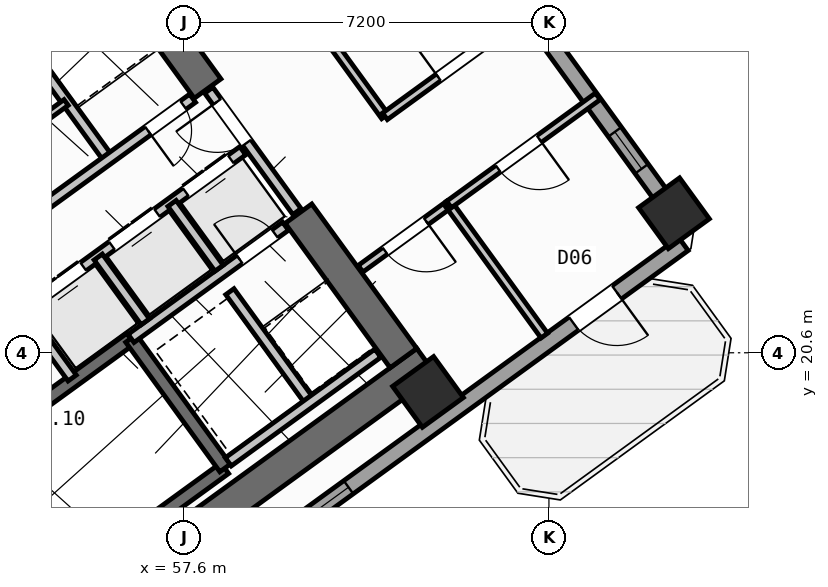
"""IFC4 building model, lengths in metres.
Left out: names, types, materials, properties, quantities, classifications, styles, units other than length and angle.
Written with IfcOpenShell. Run it as: python <this file> out.ifc"""

import sys

from ifc_helpers import new_model, si_unit, direction, frame, frame_2d, origin, origin_2d, place, context, subcontext, project, spatial, rectangle, hollow_rectangle, extrude, source, transform, mapped, element, fill, save


model = new_model("IFC4")
c1 = context("Model", 3, precision=1e-05, world=origin(), true_north=direction((0.0, 1.0)))
c2 = subcontext(c1, "Body", "Model", "MODEL_VIEW")
j1 = project(units=[si_unit("LENGTHUNIT", "METRE"), si_unit("PLANEANGLEUNIT", "RADIAN")], contexts=[c1])
p1 = place(None, origin())
s1 = spatial("IfcSite", under=j1, at=p1, CompositionType="ELEMENT")
p2 = place(p1, origin())
s2 = spatial("IfcBuilding", under=s1, at=p2, CompositionType="ELEMENT")
p3 = place(p2, frame((0.0, 0.0, 81.0)))
s3 = spatial("IfcBuildingStorey", under=s2, at=p3, CompositionType="ELEMENT", Elevation=81.0)
p4 = place(p3, frame((52.318, 13.11, 0.0), z_axis=(0.0, 0.0, 1.0), x_axis=(0.809019445368, 0.587781878776, 0.0)))
e1 = element("IfcWall", 1, at=p4, inside=s3, PredefinedType="SHEAR", context=c2, shape_type="SweptSolid", body=[
    extrude(rectangle(XDim=12.44, YDim=0.65, at=frame_2d((6.22, 0.0))), origin(), (0.0, 0.0, 1.0), 3.32),
])
p5 = place(p3, frame((61.929, 20.494, 0.0), z_axis=(0.0, 0.0, 1.0), x_axis=(-0.58782982593, 0.808984607855, 0.0)))
e2 = element("IfcWall", 2, at=p5, inside=s3, PredefinedType="SHEAR", context=c2, shape_type="SweptSolid", body=[
    extrude(rectangle(XDim=3.525, YDim=0.65, at=frame_2d((1.762, 0.0))), origin(), (0.0, 0.0, 1.0), 3.32),
])
p6 = place(p3, frame((58.064, 25.813, 0.0), z_axis=(0.0, 0.0, 1.0), x_axis=(-0.58777996584, 0.809020835181, 0.0)))
e3 = element("IfcWall", 3, at=p6, inside=s3, PredefinedType="SHEAR", context=c2, shape_type="SweptSolid", body=[
    extrude(rectangle(XDim=6.375, YDim=0.65, at=frame_2d((3.188, 0.0))), origin(), (0.0, 0.0, 1.0), 3.32),
])
m1 = source(origin(), c2, "Body", "SweptSolid", [
    extrude(hollow_rectangle(XDim=1.0, YDim=1.0, WallThickness=0.04, at=origin_2d()), origin(), (0.0, 0.0, 1.0), 3.6),
])
for number, where, z_axis, x_axis in (
    (4, (62.414, 19.827, 0.0), (0.0, 0.0, 1.0), (0.809, 0.588, 0.0)),
    (5, (67.268, 23.354, 0.0), (0.0, 0.0, 1.0), (0.809, 0.588, 0.0)),
):
    element("IfcColumn", number, at=place(p3, frame(where, z_axis=z_axis, x_axis=x_axis)), inside=s3, PredefinedType="COLUMN", context=c2, shape_type="MappedRepresentation", body=[
        mapped(m1, transform((0.0, 0.0, 0.0), scale=1.0)),
    ])
p7 = place(p3, frame((54.81, 40.5, 0.0), z_axis=(0.0, 0.0, 1.0), x_axis=(0.587783625747, -0.809018176127, 0.0)))
e6 = element("IfcWall", 6, at=p7, inside=s3, PredefinedType="STANDARD", context=c2, shape_type="SweptSolid", body=[
    extrude(rectangle(XDim=21.587, YDim=0.32, at=frame_2d((10.794, 0.0))), origin(), (0.0, 0.0, 1.0), 2.745),
])
p8 = place(p7, frame((2.356, 0.0, 0.8)))
e7 = element("IfcOpeningElement", 7, at=p8, cuts=e6, PredefinedType="OPENING", context=c2, shape_type="SweptSolid", body=[
    extrude(rectangle(XDim=2.1, YDim=1.55, at=frame_2d((1.05, 0.775))), frame((0.0, 0.17, 0.0), z_axis=(0.0, -1.0, 0.0), x_axis=(1.0, 0.0, 0.0)), (0.0, 0.0, 1.0), 0.34),
])
p9 = place(p7, frame((9.344, 0.0, 0.85)))
e8 = element("IfcOpeningElement", 8, at=p9, cuts=e6, PredefinedType="OPENING", context=c2, shape_type="SweptSolid", body=[
    extrude(rectangle(XDim=1.8, YDim=1.5, at=frame_2d((0.9, 0.75))), frame((0.0, 0.17, 0.0), z_axis=(0.0, -1.0, 0.0), x_axis=(1.0, 0.0, 0.0)), (0.0, 0.0, 1.0), 0.34),
])
p10 = place(p7, frame((19.209, 0.0, 1.0)))
e9 = element("IfcOpeningElement", 9, at=p10, cuts=e6, PredefinedType="OPENING", context=c2, shape_type="SweptSolid", body=[
    extrude(rectangle(XDim=0.9, YDim=1.25, at=frame_2d((0.45, 0.625))), frame((0.0, 0.17, 0.0), z_axis=(0.0, -1.0, 0.0), x_axis=(1.0, 0.0, 0.0)), (0.0, 0.0, 1.0), 0.34),
])
p11 = place(p3, frame((67.454, 22.747, 0.0), z_axis=(0.0, 0.0, 1.0), x_axis=(-0.809021120468, -0.587779573171, 0.0)))
e10 = element("IfcWall", 10, at=p11, inside=s3, PredefinedType="STANDARD", context=c2, shape_type="SweptSolid", body=[
    extrude(rectangle(XDim=17.588, YDim=0.32, at=frame_2d((8.794, 0.0))), origin(), (0.0, 0.0, 1.0), 3.32),
])
p12 = place(p11, frame((1.624, 0.0, 0.0)))
e11 = element("IfcOpeningElement", 11, at=p12, cuts=e10, PredefinedType="OPENING", context=c2, shape_type="SweptSolid", body=[
    extrude(rectangle(XDim=1.05, YDim=2.15, at=frame_2d((0.525, 1.075))), frame((0.0, 0.17, 0.0), z_axis=(0.0, -1.0, 0.0), x_axis=(1.0, 0.0, 0.0)), (0.0, 0.0, 1.0), 0.34),
])
p13 = place(p11, frame((8.169, 0.0, 0.8)))
e12 = element("IfcOpeningElement", 12, at=p13, cuts=e10, PredefinedType="OPENING", context=c2, shape_type="SweptSolid", body=[
    extrude(rectangle(XDim=2.1, YDim=1.55, at=frame_2d((1.05, 0.775))), frame((0.0, 0.17, 0.0), z_axis=(0.0, -1.0, 0.0), x_axis=(1.0, 0.0, 0.0)), (0.0, 0.0, 1.0), 0.34),
])
p14 = place(p11, frame((13.319, 0.0, 0.8)))
e13 = element("IfcOpeningElement", 13, at=p14, cuts=e10, PredefinedType="OPENING", context=c2, shape_type="SweptSolid", body=[
    extrude(rectangle(XDim=2.1, YDim=1.55, at=frame_2d((1.05, 0.775))), frame((0.0, 0.17, 0.0), z_axis=(0.0, -1.0, 0.0), x_axis=(1.0, 0.0, 0.0)), (0.0, 0.0, 1.0), 0.34),
])
p15 = place(p3, frame((49.863, 23.44, 0.0), z_axis=(0.0, 0.0, 1.0), x_axis=(0.809003474932, 0.587803859759, 0.0)))
e14 = element("IfcWall", 14, at=p15, inside=s3, PredefinedType="SHEAR", context=c2, shape_type="SweptSolid", body=[
    extrude(rectangle(XDim=7.46, YDim=0.26, at=frame_2d((3.73, 0.0))), origin(), (0.0, 0.0, 1.0), 3.32),
])
p16 = place(p15, frame((0.36, 0.0, 0.0)))
e15 = element("IfcOpeningElement", 15, at=p16, cuts=e14, PredefinedType="OPENING", context=c2, shape_type="SweptSolid", body=[
    extrude(rectangle(XDim=0.86, YDim=2.05, at=frame_2d((0.43, 1.025))), frame((0.0, 0.14, 0.0), z_axis=(0.0, -1.0, 0.0), x_axis=(1.0, 0.0, 0.0)), (0.0, 0.0, 1.0), 0.28),
])
p17 = place(p3, frame((52.472, 14.013, 0.0), z_axis=(0.0, 0.0, 1.0), x_axis=(0.809028366311, 0.587769599847, 0.0)))
e16 = element("IfcWall", 16, at=p17, inside=s3, PredefinedType="SHEAR", context=c2, shape_type="SweptSolid", body=[
    extrude(rectangle(XDim=7.33, YDim=0.26, at=frame_2d((3.665, 0.0))), origin(), (0.0, 0.0, 1.0), 3.32),
])
p18 = place(p3, frame((50.615, 16.57, 0.0), z_axis=(0.0, 0.0, 1.0), x_axis=(0.809028366311, 0.587769599847, 0.0)))
e17 = element("IfcWall", 17, at=p18, inside=s3, PredefinedType="SHEAR", context=c2, shape_type="SweptSolid", body=[
    extrude(rectangle(XDim=7.33, YDim=0.26, at=frame_2d((3.665, 0.0))), origin(), (0.0, 0.0, 1.0), 3.32),
])
p19 = place(p18, frame((0.22, 0.0, 0.0)))
e18 = element("IfcOpeningElement", 18, at=p19, cuts=e17, PredefinedType="OPENING", context=c2, shape_type="SweptSolid", body=[
    extrude(rectangle(XDim=1.1, YDim=2.1, at=frame_2d((0.55, 1.05))), frame((0.0, 0.14, 0.0), z_axis=(0.0, -1.0, 0.0), x_axis=(1.0, 0.0, 0.0)), (0.0, 0.0, 1.0), 0.28),
])
p20 = place(p3, frame((58.41, 18.327, 0.0), z_axis=(0.0, 0.0, 1.0), x_axis=(-0.58776738483, 0.809029975545, 0.0)))
e19 = element("IfcWall", 19, at=p20, inside=s3, PredefinedType="SHEAR", context=c2, shape_type="SweptSolid", body=[
    extrude(rectangle(XDim=3.16, YDim=0.26, at=frame_2d((1.58, 0.0))), origin(), (0.0, 0.0, 1.0), 3.32),
])
p21 = place(p3, frame((56.553, 20.884, 0.0), z_axis=(0.0, 0.0, 1.0), x_axis=(0.809035789462, 0.587759382205, 0.0)))
e20 = element("IfcWall", 20, at=p21, inside=s3, PredefinedType="STANDARD", context=c2, shape_type="SweptSolid", body=[
    extrude(rectangle(XDim=3.768, YDim=0.2, at=frame_2d((1.884, 0.0))), origin(), (0.0, 0.0, 1.0), 3.31),
])
p22 = place(p21, frame((2.65, 0.0, 0.0)))
e21 = element("IfcOpeningElement", 21, at=p22, cuts=e20, PredefinedType="OPENING", context=c2, shape_type="SweptSolid", body=[
    extrude(rectangle(XDim=0.86, YDim=2.05, at=frame_2d((0.43, 1.025))), frame((0.0, 0.11, 0.0), z_axis=(0.0, -1.0, 0.0), x_axis=(1.0, 0.0, 0.0)), (0.0, 0.0, 1.0), 0.22),
])
p23 = place(p3, frame((54.421, 21.436, 0.0), z_axis=(0.0, 0.0, 1.0), x_axis=(0.809013710463, 0.587789772183, 0.0)))
e22 = element("IfcWall", 22, at=p23, inside=s3, PredefinedType="STANDARD", context=c2, shape_type="SweptSolid", body=[
    extrude(rectangle(XDim=5.36, YDim=0.2, at=frame_2d((2.68, 0.0))), origin(), (0.0, 0.0, 1.0), 3.31),
])
p24 = place(p23, frame((0.37, 0.0, 0.0)))
e23 = element("IfcOpeningElement", 23, at=p24, cuts=e22, PredefinedType="OPENING", context=c2, shape_type="SweptSolid", body=[
    extrude(rectangle(XDim=1.1, YDim=2.15, at=frame_2d((0.55, 1.075))), frame((0.0, 0.11, 0.0), z_axis=(0.0, -1.0, 0.0), x_axis=(1.0, 0.0, 0.0)), (0.0, 0.0, 1.0), 0.22),
])
p25 = place(p23, frame((2.17, 0.0, 0.0)))
e24 = element("IfcOpeningElement", 24, at=p25, cuts=e22, PredefinedType="OPENING", context=c2, shape_type="SweptSolid", body=[
    extrude(rectangle(XDim=1.1, YDim=2.15, at=frame_2d((0.55, 1.075))), frame((0.0, 0.11, 0.0), z_axis=(0.0, -1.0, 0.0), x_axis=(1.0, 0.0, 0.0)), (0.0, 0.0, 1.0), 0.22),
])
p26 = place(p23, frame((3.97, 0.0, 0.0)))
e25 = element("IfcOpeningElement", 25, at=p26, cuts=e22, PredefinedType="OPENING", context=c2, shape_type="SweptSolid", body=[
    extrude(rectangle(XDim=1.1, YDim=2.15, at=frame_2d((0.55, 1.075))), frame((0.0, 0.11, 0.0), z_axis=(0.0, -1.0, 0.0), x_axis=(1.0, 0.0, 0.0)), (0.0, 0.0, 1.0), 0.22),
])
p27 = place(p3, frame((55.391, 20.102, 0.0), z_axis=(0.0, 0.0, 1.0), x_axis=(-0.58778447739, 0.809017557374, 0.0)))
e26 = element("IfcWall", 26, at=p27, inside=s3, PredefinedType="STANDARD", context=c2, shape_type="SweptSolid", body=[
    extrude(rectangle(XDim=1.65, YDim=0.2, at=frame_2d((0.825, 0.0))), origin(), (0.0, 0.0, 1.0), 3.31),
])
p28 = place(p3, frame((56.834, 21.212, 0.0), z_axis=(0.0, 0.0, 1.0), x_axis=(-0.58776738483, 0.809029975545, 0.0)))
e27 = element("IfcWall", 27, at=p28, inside=s3, PredefinedType="STANDARD", context=c2, shape_type="SweptSolid", body=[
    extrude(rectangle(XDim=1.58, YDim=0.2, at=frame_2d((0.79, 0.0))), origin(), (0.0, 0.0, 1.0), 3.31),
])
p29 = place(p3, frame((58.29, 22.27, 0.0), z_axis=(0.0, 0.0, 1.0), x_axis=(-0.587840865826, 0.808976585857, 0.0)))
e28 = element("IfcWall", 28, at=p29, inside=s3, PredefinedType="STANDARD", context=c2, shape_type="SweptSolid", body=[
    extrude(rectangle(XDim=1.58, YDim=0.2, at=frame_2d((0.79, 0.0))), origin(), (0.0, 0.0, 1.0), 3.31),
])
p30 = place(p3, frame((60.067, 19.655, 0.0), z_axis=(0.0, 0.0, 1.0), x_axis=(-0.587800520745, 0.809005900975, 0.0)))
e29 = element("IfcWall", 29, at=p30, inside=s3, PredefinedType="STANDARD", context=c2, shape_type="SweptSolid", body=[
    extrude(rectangle(XDim=2.66, YDim=0.2, at=frame_2d((1.33, 0.0))), origin(), (0.0, 0.0, 1.0), 3.31),
])
p31 = place(p3, frame((58.472, 18.447, 0.0), z_axis=(0.0, 0.0, 1.0), x_axis=(0.809022487728, 0.587777691266, 0.0)))
e30 = element("IfcWall", 30, at=p31, inside=s3, PredefinedType="STANDARD", context=c2, shape_type="SweptSolid", body=[
    extrude(rectangle(XDim=3.648, YDim=0.2, at=frame_2d((1.824, 0.0))), origin(), (0.0, 0.0, 1.0), 3.31),
])
p32 = place(p3, frame((56.111, 24.419, 0.0), z_axis=(0.0, 0.0, 1.0), x_axis=(-0.58777848983, 0.809021907548, 0.0)))
e31 = element("IfcWall", 31, at=p32, inside=s3, PredefinedType="STANDARD", context=c2, shape_type="SweptSolid", body=[
    extrude(rectangle(XDim=2.88, YDim=0.2, at=frame_2d((1.44, 0.0))), origin(), (0.0, 0.0, 1.0), 3.31),
])
p33 = place(p3, frame((53.425, 22.468, 0.0), z_axis=(0.0, 0.0, 1.0), x_axis=(0.80902705128, 0.587771409902, 0.0)))
e32 = element("IfcWall", 32, at=p33, inside=s3, PredefinedType="STANDARD", context=c2, shape_type="SweptSolid", body=[
    extrude(rectangle(XDim=5.368, YDim=0.2, at=frame_2d((2.684, 0.0))), origin(), (0.0, 0.0, 1.0), 3.31),
])
p34 = place(p33, frame((4.28, 0.0, 0.0)))
e33 = element("IfcOpeningElement", 33, at=p34, cuts=e32, PredefinedType="OPENING", context=c2, shape_type="SweptSolid", body=[
    extrude(rectangle(XDim=0.86, YDim=2.05, at=frame_2d((0.43, 1.025))), frame((0.0, 0.11, 0.0), z_axis=(0.0, -1.0, 0.0), x_axis=(1.0, 0.0, 0.0)), (0.0, 0.0, 1.0), 0.22),
])
p35 = place(p33, frame((0.35, 0.0, 0.0)))
e34 = element("IfcOpeningElement", 34, at=p35, cuts=e32, PredefinedType="OPENING", context=c2, shape_type="SweptSolid", body=[
    extrude(rectangle(XDim=0.86, YDim=2.05, at=frame_2d((0.43, 1.025))), frame((0.0, 0.11, 0.0), z_axis=(0.0, -1.0, 0.0), x_axis=(1.0, 0.0, 0.0)), (0.0, 0.0, 1.0), 0.22),
])
p36 = place(p3, frame((52.618, 23.612, 0.0), z_axis=(0.0, 0.0, 1.0), x_axis=(0.809009587469, 0.587795446889, 0.0)))
e35 = element("IfcWall", 35, at=p36, inside=s3, PredefinedType="PLUMBINGWALL", context=c2, shape_type="SweptSolid", body=[
    extrude(rectangle(XDim=3.28, YDim=0.14, at=frame_2d((1.64, 0.0))), origin(), (0.0, 0.0, 1.0), 3.31),
])
p37 = place(p36, frame((0.25, 0.0, 0.0)))
e36 = element("IfcOpeningElement", 36, at=p37, cuts=e35, PredefinedType="OPENING", context=c2, shape_type="SweptSolid", body=[
    extrude(rectangle(XDim=0.78, YDim=2.05, at=frame_2d((0.39, 1.025))), frame((0.0, 0.08, 0.0), z_axis=(0.0, -1.0, 0.0), x_axis=(1.0, 0.0, 0.0)), (0.0, 0.0, 1.0), 0.16),
])
p38 = place(p36, frame((1.92, 0.0, 0.0)))
e37 = element("IfcOpeningElement", 37, at=p38, cuts=e35, PredefinedType="OPENING", context=c2, shape_type="SweptSolid", body=[
    extrude(rectangle(XDim=0.78, YDim=2.05, at=frame_2d((0.39, 1.025))), frame((0.0, 0.08, 0.0), z_axis=(0.0, -1.0, 0.0), x_axis=(1.0, 0.0, 0.0)), (0.0, 0.0, 1.0), 0.16),
])
p39 = place(p3, frame((59.827, 23.386, 0.0), z_axis=(0.0, 0.0, 1.0), x_axis=(-0.587803840107, 0.809003489211, 0.0)))
e38 = element("IfcWall", 38, at=p39, inside=s3, PredefinedType="STANDARD", context=c2, shape_type="SweptSolid", body=[
    extrude(rectangle(XDim=2.96, YDim=0.2, at=frame_2d((1.48, 0.0))), origin(), (0.0, 0.0, 1.0), 3.31),
])
p40 = place(p39, frame((1.68, 0.0, 0.0)))
e39 = element("IfcOpeningElement", 39, at=p40, cuts=e38, PredefinedType="OPENING", context=c2, shape_type="SweptSolid", body=[
    extrude(rectangle(XDim=1.0, YDim=2.1, at=frame_2d((0.5, 1.05))), frame((0.0, 0.11, 0.0), z_axis=(0.0, -1.0, 0.0), x_axis=(1.0, 0.0, 0.0)), (0.0, 0.0, 1.0), 0.22),
])
p41 = place(p3, frame((61.082, 22.259, 0.0), z_axis=(0.0, 0.0, 1.0), x_axis=(0.809044195715, 0.587747811039, 0.0)))
e40 = element("IfcWall", 40, at=p41, inside=s3, PredefinedType="PARTITIONING", context=c2, shape_type="SweptSolid", body=[
    extrude(rectangle(XDim=2.158, YDim=0.16, at=frame_2d((1.079, 0.0))), origin(), (0.0, 0.0, 1.0), 3.31),
])
p42 = place(p41, frame((0.598, 0.0, 0.0)))
e41 = element("IfcOpeningElement", 41, at=p42, cuts=e40, PredefinedType="OPENING", context=c2, shape_type="SweptSolid", body=[
    extrude(rectangle(XDim=1.0, YDim=2.1, at=frame_2d((0.5, 1.05))), frame((0.0, 0.09, 0.0), z_axis=(0.0, -1.0, 0.0), x_axis=(1.0, 0.0, 0.0)), (0.0, 0.0, 1.0), 0.18),
])
p43 = place(p3, frame((64.709, 20.938, 0.0), z_axis=(0.0, 0.0, 1.0), x_axis=(-0.587772420479, 0.809026317077, 0.0)))
e42 = element("IfcWall", 42, at=p43, inside=s3, PredefinedType="PARTITIONING", context=c2, shape_type="SweptSolid", body=[
    extrude(rectangle(XDim=3.2, YDim=0.16, at=frame_2d((1.6, 0.0))), origin(), (0.0, 0.0, 1.0), 3.31),
])
p44 = place(p3, frame((61.564, 25.266, 0.0), z_axis=(0.0, 0.0, 1.0), x_axis=(-0.587784527444, 0.809017521007, 0.0)))
e43 = element("IfcWall", 43, at=p44, inside=s3, PredefinedType="PARTITIONING", context=c2, shape_type="SweptSolid", body=[
    extrude(rectangle(XDim=16.35, YDim=0.16, at=frame_2d((8.175, 0.0))), origin(), (0.0, 0.0, 1.0), 3.31),
])
p45 = place(p3, frame((62.828, 23.527, 0.0), z_axis=(0.0, 0.0, 1.0), x_axis=(0.809003564202, 0.587803736896, 0.0)))
e44 = element("IfcWall", 44, at=p45, inside=s3, PredefinedType="PARTITIONING", context=c2, shape_type="SweptSolid", body=[
    extrude(rectangle(XDim=3.63, YDim=0.16, at=frame_2d((1.815, 0.0))), origin(), (0.0, 0.0, 1.0), 3.31),
])
p46 = place(p45, frame((1.2, 0.0, 0.0)))
e45 = element("IfcOpeningElement", 45, at=p46, cuts=e44, PredefinedType="OPENING", context=c2, shape_type="SweptSolid", body=[
    extrude(rectangle(XDim=1.0, YDim=2.1, at=frame_2d((0.5, 1.05))), frame((0.0, 0.09, 0.0), z_axis=(0.0, -1.0, 0.0), x_axis=(1.0, 0.0, 0.0)), (0.0, 0.0, 1.0), 0.18),
])
p47 = place(p3, frame((61.564, 25.266, 0.0), z_axis=(0.0, 0.0, 1.0), x_axis=(0.809012309495, 0.587791700422, 0.0)))
e46 = element("IfcWall", 46, at=p47, inside=s3, PredefinedType="PARTITIONING", context=c2, shape_type="SweptSolid", body=[
    extrude(rectangle(XDim=3.63, YDim=0.16, at=frame_2d((1.815, 0.0))), origin(), (0.0, 0.0, 1.0), 3.31),
])
p48 = place(p47, frame((1.305, 0.0, 0.0)))
e47 = element("IfcOpeningElement", 47, at=p48, cuts=e46, PredefinedType="OPENING", context=c2, shape_type="SweptSolid", body=[
    extrude(rectangle(XDim=1.0, YDim=2.1, at=frame_2d((0.5, 1.05))), frame((0.0, 0.09, 0.0), z_axis=(0.0, -1.0, 0.0), x_axis=(1.0, 0.0, 0.0)), (0.0, 0.0, 1.0), 0.18),
])
m2 = source(origin(), c2, "Body", "SweptSolid", [
    extrude(rectangle(XDim=1.05, YDim=2.15, at=frame_2d((0.525, 1.075))), frame((0.0, 0.025, 0.0), z_axis=(0.0, -1.0, 0.0), x_axis=(1.0, 0.0, 0.0)), (0.0, 0.0, 1.0), 0.05),
])
p49 = place(p12, origin())
e48 = element("IfcDoor", 48, at=p49, inside=s3, OperationType="SINGLE_SWING_LEFT", PredefinedType="DOOR", context=c2, shape_type="MappedRepresentation", body=[
    mapped(m2, transform((0.0, 0.0, 0.0), scale=1.0)),
])
fill(e11, e48)
m3 = source(origin(), c2, "Body", "SweptSolid", [
    extrude(rectangle(XDim=0.9, YDim=1.25, at=frame_2d((0.45, 0.625))), frame((0.0, 0.03, 0.0), z_axis=(0.0, -1.0, 0.0), x_axis=(1.0, 0.0, 0.0)), (0.0, 0.0, 1.0), 0.06),
])
p50 = place(p10, origin())
e49 = element("IfcWindow", 49, at=p50, inside=s3, PartitioningType="SINGLE_PANEL", PredefinedType="WINDOW", context=c2, shape_type="MappedRepresentation", body=[
    mapped(m3, transform((0.0, 0.0, 0.0), scale=1.0)),
])
fill(e9, e49)
m4 = source(origin(), c2, "Body", "SweptSolid", [
    extrude(rectangle(XDim=2.1, YDim=1.55, at=frame_2d((1.05, 0.775))), frame((0.0, 0.03, 0.0), z_axis=(0.0, -1.0, 0.0), x_axis=(1.0, 0.0, 0.0)), (0.0, 0.0, 1.0), 0.06),
])
p51 = place(p13, origin())
e50 = element("IfcWindow", 50, at=p51, inside=s3, PartitioningType="SINGLE_PANEL", PredefinedType="WINDOW", context=c2, shape_type="MappedRepresentation", body=[
    mapped(m4, transform((0.0, 0.0, 0.0), scale=1.0)),
])
fill(e12, e50)
m5 = source(origin(), c2, "Body", "SweptSolid", [
    extrude(rectangle(XDim=1.1, YDim=2.15, at=frame_2d((0.55, 1.075))), frame((0.0, 0.025, 0.0), z_axis=(0.0, -1.0, 0.0), x_axis=(1.0, 0.0, 0.0)), (0.0, 0.0, 1.0), 0.05),
])
p52 = place(p24, origin())
e51 = element("IfcDoor", 51, at=p52, inside=s3, OperationType="DOUBLE_DOOR_SLIDING", PredefinedType="DOOR", context=c2, shape_type="MappedRepresentation", body=[
    mapped(m5, transform((0.0, 0.0, 0.0), scale=1.0)),
])
fill(e23, e51)
p53 = place(p25, origin())
e52 = element("IfcDoor", 52, at=p53, inside=s3, OperationType="DOUBLE_DOOR_SLIDING", PredefinedType="DOOR", context=c2, shape_type="MappedRepresentation", body=[
    mapped(m5, transform((0.0, 0.0, 0.0), scale=1.0)),
])
fill(e24, e52)
p54 = place(p26, origin())
e53 = element("IfcDoor", 53, at=p54, inside=s3, OperationType="DOUBLE_DOOR_SLIDING", PredefinedType="DOOR", context=c2, shape_type="MappedRepresentation", body=[
    mapped(m5, transform((0.0, 0.0, 0.0), scale=1.0)),
])
fill(e25, e53)
m6 = source(origin(), c2, "Body", "SweptSolid", [
    extrude(rectangle(XDim=0.86, YDim=2.05, at=frame_2d((0.43, 1.025))), frame((0.0, 0.025, 0.0), z_axis=(0.0, -1.0, 0.0), x_axis=(1.0, 0.0, 0.0)), (0.0, 0.0, 1.0), 0.05),
])
p55 = place(p22, origin())
e54 = element("IfcDoor", 54, at=p55, inside=s3, OperationType="SINGLE_SWING_LEFT", PredefinedType="DOOR", context=c2, shape_type="MappedRepresentation", body=[
    mapped(m6, transform((0.0, 0.0, 0.0), scale=1.0)),
])
fill(e21, e54)
p56 = place(p34, frame((0.86, 0.0, 0.0), z_axis=(0.0, 0.0, 1.0), x_axis=(-1.0, 0.0, 0.0)))
e55 = element("IfcDoor", 55, at=p56, inside=s3, OperationType="SINGLE_SWING_RIGHT", PredefinedType="DOOR", context=c2, shape_type="MappedRepresentation", body=[
    mapped(m6, transform((0.0, 0.0, 0.0), scale=1.0)),
])
fill(e33, e55)
m7 = source(origin(), c2, "Body", "SweptSolid", [
    extrude(rectangle(XDim=1.0, YDim=2.1, at=frame_2d((0.5, 1.05))), frame((0.0, 0.025, 0.0), z_axis=(0.0, -1.0, 0.0), x_axis=(1.0, 0.0, 0.0)), (0.0, 0.0, 1.0), 0.05),
])
p57 = place(p42, frame((1.0, 0.0, 0.0), z_axis=(0.0, 0.0, 1.0), x_axis=(-1.0, 0.0, 0.0)))
e56 = element("IfcDoor", 56, at=p57, inside=s3, OperationType="SINGLE_SWING_LEFT", PredefinedType="DOOR", context=c2, shape_type="MappedRepresentation", body=[
    mapped(m7, transform((0.0, 0.0, 0.0), scale=1.0)),
])
fill(e41, e56)
p58 = place(p40, origin())
e57 = element("IfcDoor", 57, at=p58, inside=s3, OperationType="SINGLE_SWING_RIGHT", PredefinedType="DOOR", context=c2, shape_type="MappedRepresentation", body=[
    mapped(m7, transform((0.0, 0.0, 0.0), scale=1.0)),
])
fill(e39, e57)
p59 = place(p48, origin())
e58 = element("IfcDoor", 58, at=p59, inside=s3, OperationType="SINGLE_SWING_LEFT", PredefinedType="DOOR", context=c2, shape_type="MappedRepresentation", body=[
    mapped(m7, transform((0.0, 0.0, 0.0), scale=1.0)),
])
fill(e47, e58)
p60 = place(p46, frame((1.0, 0.0, 0.0), z_axis=(0.0, 0.0, 1.0), x_axis=(-1.0, 0.0, 0.0)))
e59 = element("IfcDoor", 59, at=p60, inside=s3, OperationType="SINGLE_SWING_LEFT", PredefinedType="DOOR", context=c2, shape_type="MappedRepresentation", body=[
    mapped(m7, transform((0.0, 0.0, 0.0), scale=1.0)),
])
fill(e45, e59)
save(model, sys.argv[1])
